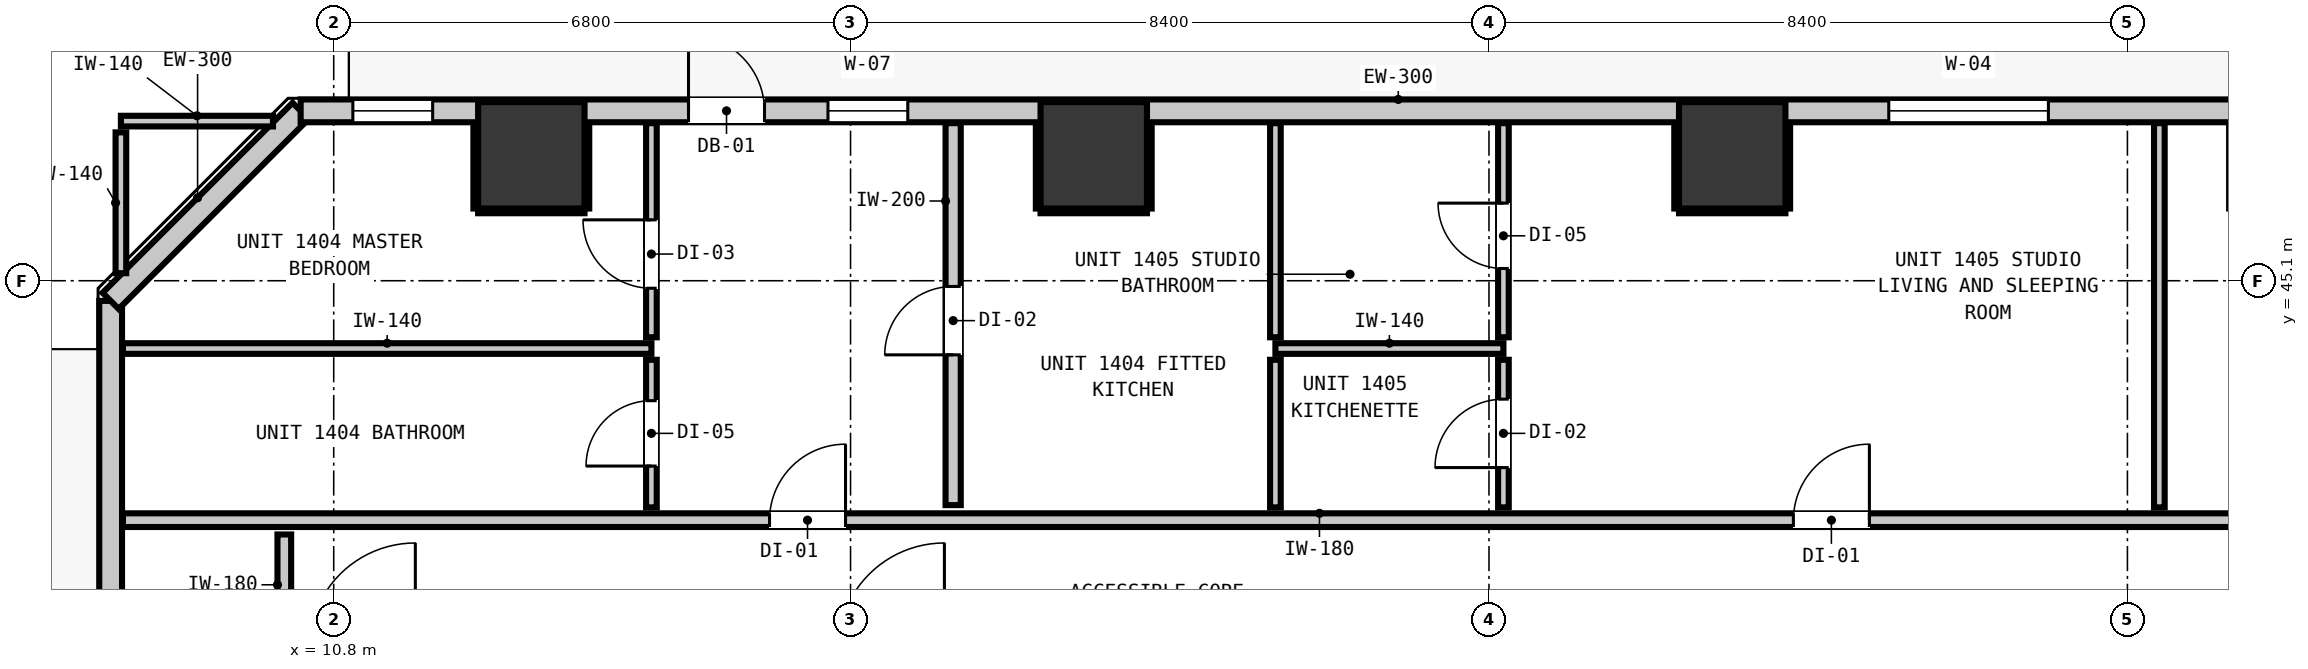
"""IFC4 building model, lengths in metres.
Left out: names, types, materials, properties, quantities, classifications, styles, units other than length and angle.
Written with IfcOpenShell. Run it as: python <this file> out.ifc"""

import sys

from ifc_helpers import new_model, si_unit, direction, frame, frame_2d, origin, origin_2d, place, context, subcontext, project, spatial, rectangle, extrude, element, fill, save


model = new_model("IFC4")
c1 = context("Model", 3, precision=1e-05, world=origin(), true_north=direction((0.0, 1.0)))
c2 = subcontext(c1, "Body", "Model", "MODEL_VIEW")
j1 = project(units=[si_unit("LENGTHUNIT", "METRE"), si_unit("PLANEANGLEUNIT", "RADIAN")], contexts=[c1])
p1 = place(None, origin())
s1 = spatial("IfcSite", under=j1, at=p1, CompositionType="ELEMENT")
p2 = place(p1, origin())
s2 = spatial("IfcBuilding", under=s1, at=p2, CompositionType="ELEMENT")
p3 = place(p2, frame((0.0, 0.0, 51.88)))
s3 = spatial("IfcBuildingStorey", under=s2, at=p3, CompositionType="ELEMENT", Elevation=51.88)
for number, where, z_axis, x_axis in (
    (1, (13.4, 46.75, 0.0), (0.0, 0.0, 1.0), (1.0, 0.0, 0.0)),
    (2, (20.8, 46.75, 0.0), (0.0, 0.0, 1.0), (1.0, 0.0, 0.0)),
    (3, (29.2, 46.75, 0.0), (0.0, 0.0, 1.0), (1.0, 0.0, 0.0)),
):
    element("IfcColumn", number, at=place(p3, frame(where, z_axis=z_axis, x_axis=x_axis)), inside=s3, PredefinedType="COLUMN", context=c2, shape_type="SweptSolid", body=[
        extrude(rectangle(XDim=1.4, YDim=1.4, at=origin_2d()), origin(), (0.0, 0.0, 1.0), 3.32),
    ])
p4 = place(p3, frame((7.865, 10.165, 0.0), z_axis=(0.0, 0.0, 1.0), x_axis=(0.0, 1.0, 0.0)))
e4 = element("IfcWall", 4, at=p4, inside=s3, PredefinedType="STANDARD", context=c2, shape_type="SweptSolid", body=[
    extrude(rectangle(XDim=34.67, YDim=0.3, at=frame_2d((17.335, 0.0))), origin(), (0.0, 0.0, 1.0), 3.06),
])
p5 = place(p4, frame((0.901, 0.0, 0.0)))
e5 = element("IfcOpeningElement", 5, at=p5, cuts=e4, PredefinedType="OPENING", context=c2, shape_type="SweptSolid", body=[
    extrude(rectangle(XDim=1.0, YDim=2.15, at=frame_2d((0.5, 1.075))), frame((0.0, 0.16, 0.0), z_axis=(0.0, -1.0, 0.0), x_axis=(1.0, 0.0, 0.0)), (0.0, 0.0, 1.0), 0.32),
])
p6 = place(p3, frame((7.865, 44.835, 0.0), z_axis=(0.0, 0.0, 1.0), x_axis=(0.707106781187, 0.707106781187, 0.0)))
e6 = element("IfcWall", 6, at=p6, inside=s3, PredefinedType="STANDARD", context=c2, shape_type="SweptSolid", body=[
    extrude(rectangle(XDim=3.536, YDim=0.3, at=frame_2d((1.768, 0.0))), origin(), (0.0, 0.0, 1.0), 3.06),
])
p7 = place(p3, frame((10.365, 47.335, 0.0), z_axis=(0.0, 0.0, 1.0), x_axis=(1.0, 0.0, 0.0)))
e7 = element("IfcWall", 7, at=p7, inside=s3, PredefinedType="STANDARD", context=c2, shape_type="SweptSolid", body=[
    extrude(rectangle(XDim=37.47, YDim=0.3, at=frame_2d((18.735, 0.0))), origin(), (0.0, 0.0, 1.0), 3.06),
])
p8 = place(p7, frame((5.103, 0.0, 0.0)))
e8 = element("IfcOpeningElement", 8, at=p8, cuts=e7, PredefinedType="OPENING", context=c2, shape_type="SweptSolid", body=[
    extrude(rectangle(XDim=1.0, YDim=2.15, at=frame_2d((0.5, 1.075))), frame((0.0, 0.16, 0.0), z_axis=(0.0, -1.0, 0.0), x_axis=(1.0, 0.0, 0.0)), (0.0, 0.0, 1.0), 0.32),
])
p9 = place(p7, frame((6.938, 0.0, 0.85)))
e9 = element("IfcOpeningElement", 9, at=p9, cuts=e7, PredefinedType="OPENING", context=c2, shape_type="SweptSolid", body=[
    extrude(rectangle(XDim=1.05, YDim=1.65, at=frame_2d((0.525, 0.825))), frame((0.0, 0.16, 0.0), z_axis=(0.0, -1.0, 0.0), x_axis=(1.0, 0.0, 0.0)), (0.0, 0.0, 1.0), 0.32),
])
p10 = place(p7, frame((0.687, 0.0, 0.85)))
e10 = element("IfcOpeningElement", 10, at=p10, cuts=e7, PredefinedType="OPENING", context=c2, shape_type="SweptSolid", body=[
    extrude(rectangle(XDim=1.05, YDim=1.65, at=frame_2d((0.525, 0.825))), frame((0.0, 0.16, 0.0), z_axis=(0.0, -1.0, 0.0), x_axis=(1.0, 0.0, 0.0)), (0.0, 0.0, 1.0), 0.32),
])
p11 = place(p7, frame((20.895, 0.0, 0.85)))
e11 = element("IfcOpeningElement", 11, at=p11, cuts=e7, PredefinedType="OPENING", context=c2, shape_type="SweptSolid", body=[
    extrude(rectangle(XDim=2.1, YDim=1.9, at=frame_2d((1.05, 0.95))), frame((0.0, 0.16, 0.0), z_axis=(0.0, -1.0, 0.0), x_axis=(1.0, 0.0, 0.0)), (0.0, 0.0, 1.0), 0.32),
])
p12 = place(p7, frame((31.057, 0.0, 0.85)))
e12 = element("IfcOpeningElement", 12, at=p12, cuts=e7, PredefinedType="OPENING", context=c2, shape_type="SweptSolid", body=[
    extrude(rectangle(XDim=2.1, YDim=1.9, at=frame_2d((1.05, 0.95))), frame((0.0, 0.16, 0.0), z_axis=(0.0, -1.0, 0.0), x_axis=(1.0, 0.0, 0.0)), (0.0, 0.0, 1.0), 0.32),
])
p13 = place(p3, frame((8.027, 41.95, 0.0), z_axis=(0.0, 0.0, 1.0), x_axis=(1.0, 0.0, 0.0)))
e13 = element("IfcWall", 13, at=p13, inside=s3, PredefinedType="PARTITIONING", context=c2, shape_type="SweptSolid", body=[
    extrude(rectangle(XDim=28.905, YDim=0.18, at=frame_2d((14.452, 0.0))), origin(), (0.0, 0.0, 1.0), 3.06),
])
p14 = place(p13, frame((8.507, 0.0, 0.0)))
e14 = element("IfcOpeningElement", 14, at=p14, cuts=e13, PredefinedType="OPENING", context=c2, shape_type="SweptSolid", body=[
    extrude(rectangle(XDim=1.0, YDim=2.15, at=frame_2d((0.5, 1.075))), frame((0.0, 0.1, 0.0), z_axis=(0.0, -1.0, 0.0), x_axis=(1.0, 0.0, 0.0)), (0.0, 0.0, 1.0), 0.2),
])
p15 = place(p13, frame((21.978, 0.0, 0.0)))
e15 = element("IfcOpeningElement", 15, at=p15, cuts=e13, PredefinedType="OPENING", context=c2, shape_type="SweptSolid", body=[
    extrude(rectangle(XDim=1.0, YDim=2.15, at=frame_2d((0.5, 1.075))), frame((0.0, 0.1, 0.0), z_axis=(0.0, -1.0, 0.0), x_axis=(1.0, 0.0, 0.0)), (0.0, 0.0, 1.0), 0.2),
])
p16 = place(p3, frame((8.027, 44.208, 0.0), z_axis=(0.0, 0.0, 1.0), x_axis=(1.0, 0.0, 0.0)))
e16 = element("IfcWall", 16, at=p16, inside=s3, PredefinedType="PARTITIONING", context=c2, shape_type="SweptSolid", body=[
    extrude(rectangle(XDim=6.953, YDim=0.14, at=frame_2d((3.477, 0.0))), origin(), (0.0, 0.0, 1.0), 3.06),
])
p17 = place(p3, frame((23.19, 44.208, 0.0), z_axis=(0.0, 0.0, 1.0), x_axis=(1.0, 0.0, 0.0)))
e17 = element("IfcWall", 17, at=p17, inside=s3, PredefinedType="PARTITIONING", context=c2, shape_type="SweptSolid", body=[
    extrude(rectangle(XDim=3.0, YDim=0.14, at=frame_2d((1.5, 0.0))), origin(), (0.0, 0.0, 1.0), 3.06),
])
p18 = place(p3, frame((8.0, 47.2, 0.0), z_axis=(0.0, 0.0, 1.0), x_axis=(1.0, 0.0, 0.0)))
e18 = element("IfcWall", 18, at=p18, inside=s3, PredefinedType="PARTITIONING", context=c2, shape_type="SweptSolid", body=[
    extrude(rectangle(XDim=2.001, YDim=0.14, at=frame_2d((1.0, 0.0))), origin(), (0.0, 0.0, 1.0), 3.06),
])
p19 = place(p3, frame((18.95, 42.148, 0.0), z_axis=(0.0, 0.0, 1.0), x_axis=(0.0, 1.0, 0.0)))
e19 = element("IfcWall", 19, at=p19, inside=s3, PredefinedType="PARTITIONING", context=c2, shape_type="SweptSolid", body=[
    extrude(rectangle(XDim=5.025, YDim=0.2, at=frame_2d((2.513, 0.0))), origin(), (0.0, 0.0, 1.0), 3.06),
])
p20 = place(p19, frame((1.977, 0.0, 0.0)))
e20 = element("IfcOpeningElement", 20, at=p20, cuts=e19, PredefinedType="OPENING", context=c2, shape_type="SweptSolid", body=[
    extrude(rectangle(XDim=0.9, YDim=2.1, at=frame_2d((0.45, 1.05))), frame((0.0, 0.11, 0.0), z_axis=(0.0, -1.0, 0.0), x_axis=(1.0, 0.0, 0.0)), (0.0, 0.0, 1.0), 0.22),
])
p21 = place(p3, frame((10.15, 40.438, 0.0), z_axis=(0.0, 0.0, 1.0), x_axis=(0.0, 1.0, 0.0)))
e21 = element("IfcWall", 21, at=p21, inside=s3, PredefinedType="PARTITIONING", context=c2, shape_type="SweptSolid", body=[
    extrude(rectangle(XDim=1.324, YDim=0.18, at=frame_2d((0.662, 0.0))), origin(), (0.0, 0.0, 1.0), 2.445),
])
p22 = place(p3, frame((8.0, 45.199, 0.0), z_axis=(0.0, 0.0, 1.0), x_axis=(0.0, 1.0, 0.0)))
e22 = element("IfcWall", 22, at=p22, inside=s3, PredefinedType="PARTITIONING", context=c2, shape_type="SweptSolid", body=[
    extrude(rectangle(XDim=1.853, YDim=0.14, at=frame_2d((0.927, 0.0))), origin(), (0.0, 0.0, 1.0), 3.06),
])
p23 = place(p3, frame((14.98, 42.118, 0.0), z_axis=(0.0, 0.0, 1.0), x_axis=(0.0, 1.0, 0.0)))
e23 = element("IfcWall", 23, at=p23, inside=s3, PredefinedType="PARTITIONING", context=c2, shape_type="SweptSolid", body=[
    extrude(rectangle(XDim=1.942, YDim=0.14, at=frame_2d((0.971, 0.0))), origin(), (0.0, 0.0, 1.0), 3.06),
])
p24 = place(p23, frame((0.544, 0.0, 0.0)))
e24 = element("IfcOpeningElement", 24, at=p24, cuts=e23, PredefinedType="OPENING", context=c2, shape_type="SweptSolid", body=[
    extrude(rectangle(XDim=0.86, YDim=2.02, at=frame_2d((0.43, 1.01))), frame((0.0, 0.08, 0.0), z_axis=(0.0, -1.0, 0.0), x_axis=(1.0, 0.0, 0.0)), (0.0, 0.0, 1.0), 0.16),
])
p25 = place(p3, frame((14.98, 44.356, 0.0), z_axis=(0.0, 0.0, 1.0), x_axis=(0.0, 1.0, 0.0)))
e25 = element("IfcWall", 25, at=p25, inside=s3, PredefinedType="PARTITIONING", context=c2, shape_type="SweptSolid", body=[
    extrude(rectangle(XDim=2.817, YDim=0.14, at=frame_2d((1.409, 0.0))), origin(), (0.0, 0.0, 1.0), 3.06),
])
p26 = place(p25, frame((0.645, 0.0, 0.0)))
e26 = element("IfcOpeningElement", 26, at=p26, cuts=e25, PredefinedType="OPENING", context=c2, shape_type="SweptSolid", body=[
    extrude(rectangle(XDim=0.9, YDim=2.1, at=frame_2d((0.45, 1.05))), frame((0.0, 0.08, 0.0), z_axis=(0.0, -1.0, 0.0), x_axis=(1.0, 0.0, 0.0)), (0.0, 0.0, 1.0), 0.16),
])
p27 = place(p3, frame((23.19, 42.118, 0.0), z_axis=(0.0, 0.0, 1.0), x_axis=(0.0, 1.0, 0.0)))
e27 = element("IfcWall", 27, at=p27, inside=s3, PredefinedType="PARTITIONING", context=c2, shape_type="SweptSolid", body=[
    extrude(rectangle(XDim=1.942, YDim=0.14, at=frame_2d((0.971, 0.0))), origin(), (0.0, 0.0, 1.0), 3.06),
])
p28 = place(p3, frame((23.19, 44.356, 0.0), z_axis=(0.0, 0.0, 1.0), x_axis=(0.0, 1.0, 0.0)))
e28 = element("IfcWall", 28, at=p28, inside=s3, PredefinedType="PARTITIONING", context=c2, shape_type="SweptSolid", body=[
    extrude(rectangle(XDim=2.817, YDim=0.14, at=frame_2d((1.409, 0.0))), origin(), (0.0, 0.0, 1.0), 3.06),
])
p29 = place(p3, frame((26.19, 42.118, 0.0), z_axis=(0.0, 0.0, 1.0), x_axis=(0.0, 1.0, 0.0)))
e29 = element("IfcWall", 29, at=p29, inside=s3, PredefinedType="PARTITIONING", context=c2, shape_type="SweptSolid", body=[
    extrude(rectangle(XDim=1.942, YDim=0.14, at=frame_2d((0.971, 0.0))), origin(), (0.0, 0.0, 1.0), 3.06),
])
p30 = place(p29, frame((0.524, 0.0, 0.0)))
e30 = element("IfcOpeningElement", 30, at=p30, cuts=e29, PredefinedType="OPENING", context=c2, shape_type="SweptSolid", body=[
    extrude(rectangle(XDim=0.9, YDim=2.1, at=frame_2d((0.45, 1.05))), frame((0.0, 0.08, 0.0), z_axis=(0.0, -1.0, 0.0), x_axis=(1.0, 0.0, 0.0)), (0.0, 0.0, 1.0), 0.16),
])
p31 = place(p3, frame((26.19, 44.356, 0.0), z_axis=(0.0, 0.0, 1.0), x_axis=(0.0, 1.0, 0.0)))
e31 = element("IfcWall", 31, at=p31, inside=s3, PredefinedType="PARTITIONING", context=c2, shape_type="SweptSolid", body=[
    extrude(rectangle(XDim=2.817, YDim=0.14, at=frame_2d((1.409, 0.0))), origin(), (0.0, 0.0, 1.0), 3.06),
])
p32 = place(p31, frame((0.905, 0.0, 0.0)))
e32 = element("IfcOpeningElement", 32, at=p32, cuts=e31, PredefinedType="OPENING", context=c2, shape_type="SweptSolid", body=[
    extrude(rectangle(XDim=0.86, YDim=2.02, at=frame_2d((0.43, 1.01))), frame((0.0, 0.08, 0.0), z_axis=(0.0, -1.0, 0.0), x_axis=(1.0, 0.0, 0.0)), (0.0, 0.0, 1.0), 0.16),
])
p33 = place(p3, frame((34.82, 42.118, 0.0), z_axis=(0.0, 0.0, 1.0), x_axis=(0.0, 1.0, 0.0)))
e33 = element("IfcWall", 33, at=p33, inside=s3, PredefinedType="PARTITIONING", context=c2, shape_type="SweptSolid", body=[
    extrude(rectangle(XDim=5.055, YDim=0.14, at=frame_2d((2.528, 0.0))), origin(), (0.0, 0.0, 1.0), 3.06),
])
p34 = place(p3, frame((12.7, 46.018, 0.0), z_axis=(0.0, 0.0, 1.0), x_axis=(1.0, 0.0, 0.0)))
e34 = element("IfcWall", 34, at=p34, inside=s3, PredefinedType="PARTITIONING", context=c2, shape_type="SweptSolid", body=[
    extrude(rectangle(XDim=1.4, YDim=0.06, at=frame_2d((0.7, 0.0))), origin(), (0.0, 0.0, 1.0), 1.45),
])
for number, where, z_axis, x_axis in (
    (35, (12.668, 46.05, 0.0), (0.0, 0.0, 1.0), (0.0, 1.0, 0.0)),
    (36, (14.132, 46.05, 0.0), (0.0, 0.0, 1.0), (0.0, 1.0, 0.0)),
):
    element("IfcWall", number, at=place(p3, frame(where, z_axis=z_axis, x_axis=x_axis)), inside=s3, PredefinedType="PARTITIONING", context=c2, shape_type="SweptSolid", body=[
        extrude(rectangle(XDim=1.12, YDim=0.06, at=frame_2d((0.56, 0.0))), origin(), (0.0, 0.0, 1.0), 1.45),
    ])
p35 = place(p3, frame((20.1, 46.018, 0.0), z_axis=(0.0, 0.0, 1.0), x_axis=(1.0, 0.0, 0.0)))
e37 = element("IfcWall", 37, at=p35, inside=s3, PredefinedType="PARTITIONING", context=c2, shape_type="SweptSolid", body=[
    extrude(rectangle(XDim=1.4, YDim=0.06, at=frame_2d((0.7, 0.0))), origin(), (0.0, 0.0, 1.0), 1.45),
])
for number, where, z_axis, x_axis in (
    (38, (20.068, 46.05, 0.0), (0.0, 0.0, 1.0), (0.0, 1.0, 0.0)),
    (39, (21.532, 46.05, 0.0), (0.0, 0.0, 1.0), (0.0, 1.0, 0.0)),
):
    element("IfcWall", number, at=place(p3, frame(where, z_axis=z_axis, x_axis=x_axis)), inside=s3, PredefinedType="PARTITIONING", context=c2, shape_type="SweptSolid", body=[
        extrude(rectangle(XDim=1.12, YDim=0.06, at=frame_2d((0.56, 0.0))), origin(), (0.0, 0.0, 1.0), 1.45),
    ])
p36 = place(p3, frame((28.5, 46.018, 0.0), z_axis=(0.0, 0.0, 1.0), x_axis=(1.0, 0.0, 0.0)))
e40 = element("IfcWall", 40, at=p36, inside=s3, PredefinedType="PARTITIONING", context=c2, shape_type="SweptSolid", body=[
    extrude(rectangle(XDim=1.4, YDim=0.06, at=frame_2d((0.7, 0.0))), origin(), (0.0, 0.0, 1.0), 1.45),
])
for number, where, z_axis, x_axis in (
    (41, (28.468, 46.05, 0.0), (0.0, 0.0, 1.0), (0.0, 1.0, 0.0)),
    (42, (29.932, 46.05, 0.0), (0.0, 0.0, 1.0), (0.0, 1.0, 0.0)),
):
    element("IfcWall", number, at=place(p3, frame(where, z_axis=z_axis, x_axis=x_axis)), inside=s3, PredefinedType="PARTITIONING", context=c2, shape_type="SweptSolid", body=[
        extrude(rectangle(XDim=1.12, YDim=0.06, at=frame_2d((0.56, 0.0))), origin(), (0.0, 0.0, 1.0), 1.45),
    ])
p37 = place(p8, origin())
e43 = element("IfcDoor", 43, at=p37, inside=s3, OperationType="SINGLE_SWING_LEFT", PredefinedType="DOOR", context=c2, shape_type="SweptSolid", body=[
    extrude(rectangle(XDim=1.0, YDim=2.15, at=frame_2d((0.5, 1.075))), frame((0.0, 0.025, 0.0), z_axis=(0.0, -1.0, 0.0), x_axis=(1.0, 0.0, 0.0)), (0.0, 0.0, 1.0), 0.05),
])
fill(e8, e43)
p38 = place(p9, origin())
e44 = element("IfcWindow", 44, at=p38, inside=s3, PartitioningType="SINGLE_PANEL", PredefinedType="WINDOW", context=c2, shape_type="SweptSolid", body=[
    extrude(rectangle(XDim=1.05, YDim=1.65, at=frame_2d((0.525, 0.825))), frame((0.0, 0.03, 0.0), z_axis=(0.0, -1.0, 0.0), x_axis=(1.0, 0.0, 0.0)), (0.0, 0.0, 1.0), 0.06),
])
fill(e9, e44)
p39 = place(p10, origin())
e45 = element("IfcWindow", 45, at=p39, inside=s3, PartitioningType="SINGLE_PANEL", PredefinedType="WINDOW", context=c2, shape_type="SweptSolid", body=[
    extrude(rectangle(XDim=1.05, YDim=1.65, at=frame_2d((0.525, 0.825))), frame((0.0, 0.03, 0.0), z_axis=(0.0, -1.0, 0.0), x_axis=(1.0, 0.0, 0.0)), (0.0, 0.0, 1.0), 0.06),
])
fill(e10, e45)
p40 = place(p11, origin())
e46 = element("IfcWindow", 46, at=p40, inside=s3, PartitioningType="SINGLE_PANEL", PredefinedType="WINDOW", context=c2, shape_type="SweptSolid", body=[
    extrude(rectangle(XDim=2.1, YDim=1.9, at=frame_2d((1.05, 0.95))), frame((0.0, 0.03, 0.0), z_axis=(0.0, -1.0, 0.0), x_axis=(1.0, 0.0, 0.0)), (0.0, 0.0, 1.0), 0.06),
])
fill(e11, e46)
p41 = place(p14, origin())
e47 = element("IfcDoor", 47, at=p41, inside=s3, OperationType="SINGLE_SWING_RIGHT", PredefinedType="DOOR", context=c2, shape_type="SweptSolid", body=[
    extrude(rectangle(XDim=1.0, YDim=2.15, at=frame_2d((0.5, 1.075))), frame((0.0, 0.025, 0.0), z_axis=(0.0, -1.0, 0.0), x_axis=(1.0, 0.0, 0.0)), (0.0, 0.0, 1.0), 0.05),
])
fill(e14, e47)
p42 = place(p24, origin())
e48 = element("IfcDoor", 48, at=p42, inside=s3, OperationType="SINGLE_SWING_LEFT", PredefinedType="DOOR", context=c2, shape_type="SweptSolid", body=[
    extrude(rectangle(XDim=0.86, YDim=2.02, at=frame_2d((0.43, 1.01))), frame((0.0, 0.025, 0.0), z_axis=(0.0, -1.0, 0.0), x_axis=(1.0, 0.0, 0.0)), (0.0, 0.0, 1.0), 0.05),
])
fill(e24, e48)
p43 = place(p26, origin())
e49 = element("IfcDoor", 49, at=p43, inside=s3, OperationType="SINGLE_SWING_RIGHT", PredefinedType="DOOR", context=c2, shape_type="SweptSolid", body=[
    extrude(rectangle(XDim=0.9, YDim=2.1, at=frame_2d((0.45, 1.05))), frame((0.0, 0.025, 0.0), z_axis=(0.0, -1.0, 0.0), x_axis=(1.0, 0.0, 0.0)), (0.0, 0.0, 1.0), 0.05),
])
fill(e26, e49)
p44 = place(p20, origin())
e50 = element("IfcDoor", 50, at=p44, inside=s3, OperationType="SINGLE_SWING_LEFT", PredefinedType="DOOR", context=c2, shape_type="SweptSolid", body=[
    extrude(rectangle(XDim=0.9, YDim=2.1, at=frame_2d((0.45, 1.05))), frame((0.0, 0.025, 0.0), z_axis=(0.0, -1.0, 0.0), x_axis=(1.0, 0.0, 0.0)), (0.0, 0.0, 1.0), 0.05),
])
fill(e20, e50)
p45 = place(p15, origin())
e51 = element("IfcDoor", 51, at=p45, inside=s3, OperationType="SINGLE_SWING_RIGHT", PredefinedType="DOOR", context=c2, shape_type="SweptSolid", body=[
    extrude(rectangle(XDim=1.0, YDim=2.15, at=frame_2d((0.5, 1.075))), frame((0.0, 0.025, 0.0), z_axis=(0.0, -1.0, 0.0), x_axis=(1.0, 0.0, 0.0)), (0.0, 0.0, 1.0), 0.05),
])
fill(e15, e51)
p46 = place(p30, origin())
e52 = element("IfcDoor", 52, at=p46, inside=s3, OperationType="SINGLE_SWING_LEFT", PredefinedType="DOOR", context=c2, shape_type="SweptSolid", body=[
    extrude(rectangle(XDim=0.9, YDim=2.1, at=frame_2d((0.45, 1.05))), frame((0.0, 0.025, 0.0), z_axis=(0.0, -1.0, 0.0), x_axis=(1.0, 0.0, 0.0)), (0.0, 0.0, 1.0), 0.05),
])
fill(e30, e52)
p47 = place(p32, origin())
e53 = element("IfcDoor", 53, at=p47, inside=s3, OperationType="SINGLE_SWING_RIGHT", PredefinedType="DOOR", context=c2, shape_type="SweptSolid", body=[
    extrude(rectangle(XDim=0.86, YDim=2.02, at=frame_2d((0.43, 1.01))), frame((0.0, 0.025, 0.0), z_axis=(0.0, -1.0, 0.0), x_axis=(1.0, 0.0, 0.0)), (0.0, 0.0, 1.0), 0.05),
])
fill(e32, e53)
save(model, sys.argv[1])
